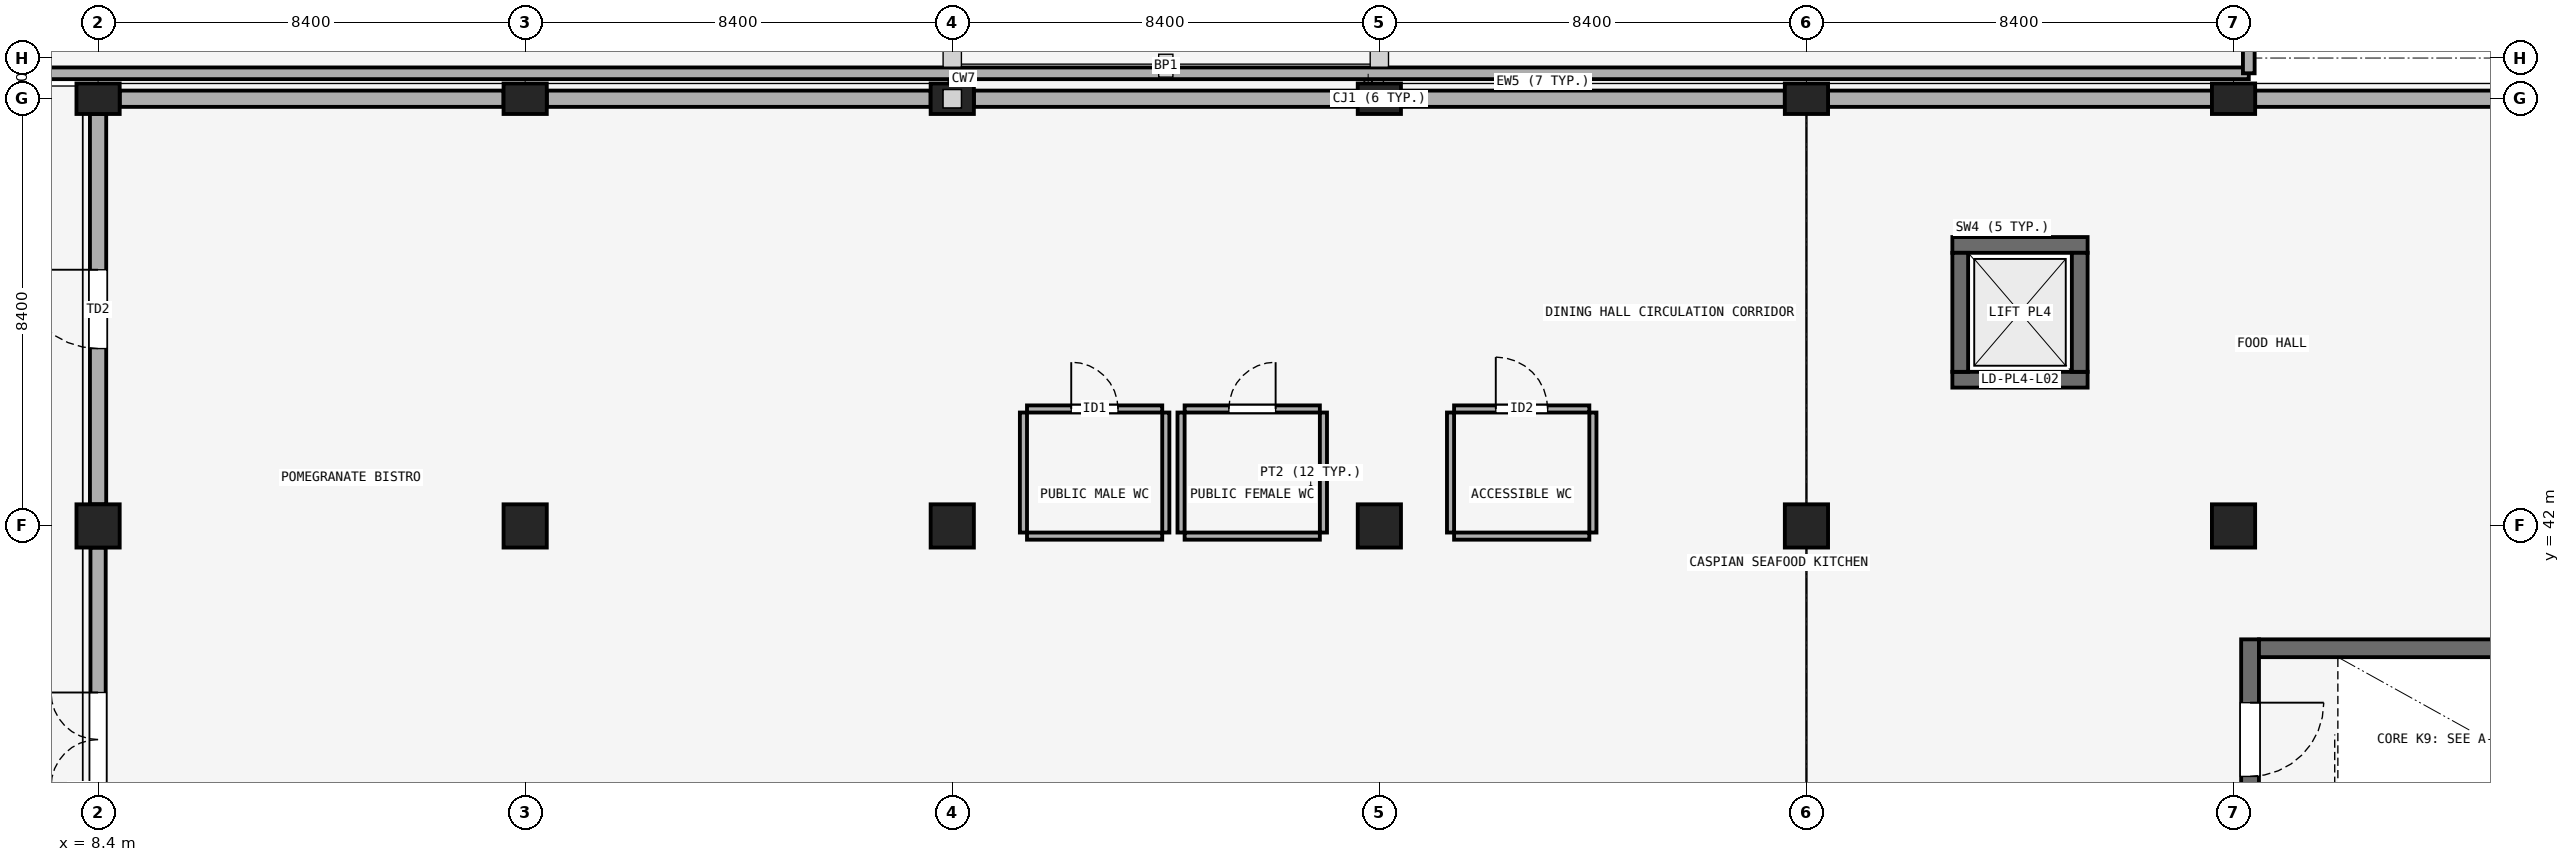
"""IFC4 building model, lengths in metres.
Left out: names, types, materials, properties, quantities, classifications, styles, units other than length and angle.
Written with IfcOpenShell. Run it as: python <this file> out.ifc"""

import sys

from ifc_helpers import new_model, si_unit, direction, frame, frame_2d, origin, origin_2d, place, context, subcontext, project, spatial, rectangle, extrude, element, fill, save


model = new_model("IFC4")
c1 = context("Model", 3, precision=1e-05, world=origin(), true_north=direction((0.0, 1.0)))
c2 = subcontext(c1, "Body", "Model", "MODEL_VIEW")
j1 = project(units=[si_unit("LENGTHUNIT", "METRE"), si_unit("PLANEANGLEUNIT", "RADIAN")], contexts=[c1])
p1 = place(None, origin())
s1 = spatial("IfcSite", under=j1, at=p1, CompositionType="ELEMENT")
p2 = place(p1, origin())
s2 = spatial("IfcBuilding", under=s1, at=p2, CompositionType="ELEMENT")
p3 = place(p2, frame((0.0, 0.0, 9.9)))
s3 = spatial("IfcBuildingStorey", under=s2, at=p3, CompositionType="ELEMENT", Elevation=9.9)
for number, where, z_axis, x_axis in (
    (1, (8.4, 42.0, 0.0), (0.0, 0.0, 1.0), (1.0, 0.0, 0.0)),
    (2, (16.8, 42.0, 0.0), (0.0, 0.0, 1.0), (1.0, 0.0, 0.0)),
    (3, (25.2, 42.0, 0.0), (0.0, 0.0, 1.0), (1.0, 0.0, 0.0)),
    (4, (33.6, 42.0, 0.0), (0.0, 0.0, 1.0), (1.0, 0.0, 0.0)),
    (5, (42.0, 42.0, 0.0), (0.0, 0.0, 1.0), (1.0, 0.0, 0.0)),
    (6, (50.4, 42.0, 0.0), (0.0, 0.0, 1.0), (1.0, 0.0, 0.0)),
):
    element("IfcColumn", number, at=place(p3, frame(where, z_axis=z_axis, x_axis=x_axis)), inside=s3, PredefinedType="COLUMN", context=c2, shape_type="SweptSolid", body=[
        extrude(rectangle(XDim=0.85, YDim=0.85, at=origin_2d()), origin(), (0.0, 0.0, 1.0), 4.5),
    ])
for number, where, z_axis, x_axis in (
    (7, (8.4, 50.4, 0.0), (0.0, 0.0, 1.0), (0.0, 1.0, 0.0)),
    (8, (16.8, 50.4, 0.0), (0.0, 0.0, 1.0), (0.0, 1.0, 0.0)),
    (9, (25.2, 50.4, 0.0), (0.0, 0.0, 1.0), (0.0, 1.0, 0.0)),
    (10, (33.6, 50.4, 0.0), (0.0, 0.0, 1.0), (0.0, 1.0, 0.0)),
    (11, (42.0, 50.4, 0.0), (0.0, 0.0, 1.0), (0.0, 1.0, 0.0)),
    (12, (50.4, 50.4, 0.0), (0.0, 0.0, 1.0), (0.0, 1.0, 0.0)),
):
    element("IfcColumn", number, at=place(p3, frame(where, z_axis=z_axis, x_axis=x_axis)), inside=s3, PredefinedType="COLUMN", context=c2, shape_type="SweptSolid", body=[
        extrude(rectangle(XDim=0.6, YDim=0.85, at=origin_2d()), origin(), (0.0, 0.0, 1.0), 4.5),
    ])
p4 = place(p3, frame((8.825, 50.4, 0.0), z_axis=(0.0, 0.0, 1.0), x_axis=(1.0, 0.0, 0.0)))
e13 = element("IfcWall", 13, at=p4, inside=s3, PredefinedType="SOLIDWALL", context=c2, shape_type="SweptSolid", body=[
    extrude(rectangle(XDim=7.55, YDim=0.32, at=frame_2d((3.775, 0.0))), origin(), (0.0, 0.0, 1.0), 3.49),
])
p5 = place(p3, frame((17.225, 50.4, 0.0), z_axis=(0.0, 0.0, 1.0), x_axis=(1.0, 0.0, 0.0)))
e14 = element("IfcWall", 14, at=p5, inside=s3, PredefinedType="SOLIDWALL", context=c2, shape_type="SweptSolid", body=[
    extrude(rectangle(XDim=7.55, YDim=0.32, at=frame_2d((3.775, 0.0))), origin(), (0.0, 0.0, 1.0), 3.49),
])
for number, where, z_axis, x_axis in (
    (15, (25.625, 50.4, 0.0), (0.0, 0.0, 1.0), (1.0, 0.0, 0.0)),
    (16, (34.025, 50.4, 0.0), (0.0, 0.0, 1.0), (1.0, 0.0, 0.0)),
    (17, (42.425, 50.4, 0.0), (0.0, 0.0, 1.0), (1.0, 0.0, 0.0)),
    (18, (50.825, 50.4, 0.0), (0.0, 0.0, 1.0), (1.0, 0.0, 0.0)),
):
    element("IfcWall", number, at=place(p3, frame(where, z_axis=z_axis, x_axis=x_axis)), inside=s3, PredefinedType="SOLIDWALL", context=c2, shape_type="SweptSolid", body=[
        extrude(rectangle(XDim=7.55, YDim=0.32, at=frame_2d((3.775, 0.0))), origin(), (0.0, 0.0, 1.0), 3.49),
    ])
p6 = place(p3, frame((8.4, 34.025, 0.0), z_axis=(0.0, 0.0, 1.0), x_axis=(0.0, 1.0, 0.0)))
e19 = element("IfcWall", 19, at=p6, inside=s3, PredefinedType="SOLIDWALL", context=c2, shape_type="SweptSolid", body=[
    extrude(rectangle(XDim=7.55, YDim=0.3, at=frame_2d((3.775, 0.0))), origin(), (0.0, 0.0, 1.0), 3.49),
])
p7 = place(p6, frame((2.85, 0.0, 0.0)))
e20 = element("IfcOpeningElement", 20, at=p7, cuts=e19, PredefinedType="OPENING", context=c2, shape_type="SweptSolid", body=[
    extrude(rectangle(XDim=1.85, YDim=2.3, at=frame_2d((0.925, 1.15))), frame((0.0, 0.16, 0.0), z_axis=(0.0, -1.0, 0.0), x_axis=(1.0, 0.0, 0.0)), (0.0, 0.0, 1.0), 0.32),
])
p8 = place(p3, frame((8.4, 42.425, 0.0), z_axis=(0.0, 0.0, 1.0), x_axis=(0.0, 1.0, 0.0)))
e21 = element("IfcWall", 21, at=p8, inside=s3, PredefinedType="SOLIDWALL", context=c2, shape_type="SweptSolid", body=[
    extrude(rectangle(XDim=7.675, YDim=0.32, at=frame_2d((3.837, 0.0))), origin(), (0.0, 0.0, 1.0), 3.49),
])
p9 = place(p8, frame((3.062, 0.0, 0.0)))
e22 = element("IfcOpeningElement", 22, at=p9, cuts=e21, PredefinedType="OPENING", context=c2, shape_type="SweptSolid", body=[
    extrude(rectangle(XDim=1.55, YDim=2.25, at=frame_2d((0.775, 1.125))), frame((0.0, 0.17, 0.0), z_axis=(0.0, -1.0, 0.0), x_axis=(1.0, 0.0, 0.0)), (0.0, 0.0, 1.0), 0.34),
])
p10 = place(p3, frame((-0.3, 50.9, 0.0), z_axis=(0.0, 0.0, 1.0), x_axis=(1.0, 0.0, 0.0)))
e23 = element("IfcWall", 23, at=p10, inside=s3, PredefinedType="PARAPET", context=c2, shape_type="SweptSolid", body=[
    extrude(rectangle(XDim=51.0, YDim=0.23, at=frame_2d((25.5, 0.0))), origin(), (0.0, 0.0, 1.0), 0.95),
])
p11 = place(p3, frame((50.7, 50.9, 0.0), z_axis=(0.0, 0.0, 1.0), x_axis=(0.0, 1.0, 0.0)))
e24 = element("IfcWall", 24, at=p11, inside=s3, PredefinedType="PARAPET", context=c2, shape_type="SweptSolid", body=[
    extrude(rectangle(XDim=8.35, YDim=0.23, at=frame_2d((4.175, 0.0))), origin(), (0.0, 0.0, 1.0), 0.95),
])
p12 = place(p3, frame((50.725, 39.77, 0.0), z_axis=(0.0, 0.0, 1.0), x_axis=(0.0, -1.0, 0.0)))
e25 = element("IfcWall", 25, at=p12, inside=s3, PredefinedType="SHEAR", context=c2, shape_type="SweptSolid", body=[
    extrude(rectangle(XDim=3.94, YDim=0.35, at=frame_2d((1.97, 0.0))), origin(), (0.0, 0.0, 1.0), 4.24),
])
p13 = place(p12, frame((1.245, 0.0, 0.0)))
e26 = element("IfcOpeningElement", 26, at=p13, cuts=e25, PredefinedType="OPENING", context=c2, shape_type="SweptSolid", body=[
    extrude(rectangle(XDim=1.45, YDim=2.2, at=frame_2d((0.725, 1.1))), frame((0.0, 0.185, 0.0), z_axis=(0.0, -1.0, 0.0), x_axis=(1.0, 0.0, 0.0)), (0.0, 0.0, 1.0), 0.37),
])
p14 = place(p3, frame((50.9, 39.595, 0.0), z_axis=(0.0, 0.0, 1.0), x_axis=(1.0, 0.0, 0.0)))
e27 = element("IfcWall", 27, at=p14, inside=s3, PredefinedType="SHEAR", context=c2, shape_type="SweptSolid", body=[
    extrude(rectangle(XDim=7.4, YDim=0.35, at=frame_2d((3.7, 0.0))), origin(), (0.0, 0.0, 1.0), 4.24),
])
p15 = place(p3, frame((44.87, 44.875, 0.0), z_axis=(0.0, 0.0, 1.0), x_axis=(1.0, 0.0, 0.0)))
e28 = element("IfcWall", 28, at=p15, inside=s3, PredefinedType="SHEAR", context=c2, shape_type="SweptSolid", body=[
    extrude(rectangle(XDim=2.66, YDim=0.31, at=frame_2d((1.33, 0.0))), origin(), (0.0, 0.0, 1.0), 4.65),
])
p16 = place(p15, frame((0.78, 0.0, 0.0)))
e29 = element("IfcOpeningElement", 29, at=p16, cuts=e28, PredefinedType="OPENING", context=c2, shape_type="SweptSolid", body=[
    extrude(rectangle(XDim=1.1, YDim=2.2, at=frame_2d((0.55, 1.1))), frame((0.0, 0.165, 0.0), z_axis=(0.0, -1.0, 0.0), x_axis=(1.0, 0.0, 0.0)), (0.0, 0.0, 1.0), 0.33),
])
p17 = place(p3, frame((44.87, 47.525, 0.0), z_axis=(0.0, 0.0, 1.0), x_axis=(1.0, 0.0, 0.0)))
e30 = element("IfcWall", 30, at=p17, inside=s3, PredefinedType="SHEAR", context=c2, shape_type="SweptSolid", body=[
    extrude(rectangle(XDim=2.66, YDim=0.31, at=frame_2d((1.33, 0.0))), origin(), (0.0, 0.0, 1.0), 4.65),
])
for number, where, z_axis, x_axis in (
    (31, (45.025, 45.03, 0.0), (0.0, 0.0, 1.0), (0.0, 1.0, 0.0)),
    (32, (47.375, 45.03, 0.0), (0.0, 0.0, 1.0), (0.0, 1.0, 0.0)),
):
    element("IfcWall", number, at=place(p3, frame(where, z_axis=z_axis, x_axis=x_axis)), inside=s3, PredefinedType="SHEAR", context=c2, shape_type="SweptSolid", body=[
        extrude(rectangle(XDim=2.34, YDim=0.31, at=frame_2d((1.17, 0.0))), origin(), (0.0, 0.0, 1.0), 4.65),
    ])
p18 = place(p3, frame((26.67, 44.3, 0.0), z_axis=(0.0, 0.0, 1.0), x_axis=(1.0, 0.0, 0.0)))
e33 = element("IfcWall", 33, at=p18, inside=s3, PredefinedType="PARTITIONING", context=c2, shape_type="SweptSolid", body=[
    extrude(rectangle(XDim=2.66, YDim=0.14, at=frame_2d((1.33, 0.0))), origin(), (0.0, 0.0, 1.0), 4.2),
])
p19 = place(p18, frame((0.87, 0.0, 0.0)))
e34 = element("IfcOpeningElement", 34, at=p19, cuts=e33, PredefinedType="OPENING", context=c2, shape_type="SweptSolid", body=[
    extrude(rectangle(XDim=0.92, YDim=2.12, at=frame_2d((0.46, 1.06))), frame((0.0, 0.08, 0.0), z_axis=(0.0, -1.0, 0.0), x_axis=(1.0, 0.0, 0.0)), (0.0, 0.0, 1.0), 0.16),
])
p20 = place(p3, frame((26.67, 41.8, 0.0), z_axis=(0.0, 0.0, 1.0), x_axis=(1.0, 0.0, 0.0)))
e35 = element("IfcWall", 35, at=p20, inside=s3, PredefinedType="PARTITIONING", context=c2, shape_type="SweptSolid", body=[
    extrude(rectangle(XDim=2.66, YDim=0.14, at=frame_2d((1.33, 0.0))), origin(), (0.0, 0.0, 1.0), 3.54),
])
for number, where, z_axis, x_axis in (
    (36, (26.6, 41.87, 0.0), (0.0, 0.0, 1.0), (0.0, 1.0, 0.0)),
    (37, (29.4, 41.87, 0.0), (0.0, 0.0, 1.0), (0.0, 1.0, 0.0)),
):
    element("IfcWall", number, at=place(p3, frame(where, z_axis=z_axis, x_axis=x_axis)), inside=s3, PredefinedType="PARTITIONING", context=c2, shape_type="SweptSolid", body=[
        extrude(rectangle(XDim=2.36, YDim=0.14, at=frame_2d((1.18, 0.0))), origin(), (0.0, 0.0, 1.0), 3.54),
    ])
p21 = place(p3, frame((29.77, 44.3, 0.0), z_axis=(0.0, 0.0, 1.0), x_axis=(1.0, 0.0, 0.0)))
e38 = element("IfcWall", 38, at=p21, inside=s3, PredefinedType="PARTITIONING", context=c2, shape_type="SweptSolid", body=[
    extrude(rectangle(XDim=2.66, YDim=0.14, at=frame_2d((1.33, 0.0))), origin(), (0.0, 0.0, 1.0), 4.2),
])
p22 = place(p21, frame((0.87, 0.0, 0.0)))
e39 = element("IfcOpeningElement", 39, at=p22, cuts=e38, PredefinedType="OPENING", context=c2, shape_type="SweptSolid", body=[
    extrude(rectangle(XDim=0.92, YDim=2.12, at=frame_2d((0.46, 1.06))), frame((0.0, 0.08, 0.0), z_axis=(0.0, -1.0, 0.0), x_axis=(1.0, 0.0, 0.0)), (0.0, 0.0, 1.0), 0.16),
])
p23 = place(p3, frame((29.77, 41.8, 0.0), z_axis=(0.0, 0.0, 1.0), x_axis=(1.0, 0.0, 0.0)))
e40 = element("IfcWall", 40, at=p23, inside=s3, PredefinedType="PARTITIONING", context=c2, shape_type="SweptSolid", body=[
    extrude(rectangle(XDim=2.66, YDim=0.14, at=frame_2d((1.33, 0.0))), origin(), (0.0, 0.0, 1.0), 3.54),
])
for number, where, z_axis, x_axis in (
    (41, (29.7, 41.87, 0.0), (0.0, 0.0, 1.0), (0.0, 1.0, 0.0)),
    (42, (32.5, 41.87, 0.0), (0.0, 0.0, 1.0), (0.0, 1.0, 0.0)),
):
    element("IfcWall", number, at=place(p3, frame(where, z_axis=z_axis, x_axis=x_axis)), inside=s3, PredefinedType="PARTITIONING", context=c2, shape_type="SweptSolid", body=[
        extrude(rectangle(XDim=2.36, YDim=0.14, at=frame_2d((1.18, 0.0))), origin(), (0.0, 0.0, 1.0), 3.54),
    ])
p24 = place(p3, frame((35.07, 44.3, 0.0), z_axis=(0.0, 0.0, 1.0), x_axis=(1.0, 0.0, 0.0)))
e43 = element("IfcWall", 43, at=p24, inside=s3, PredefinedType="PARTITIONING", context=c2, shape_type="SweptSolid", body=[
    extrude(rectangle(XDim=2.66, YDim=0.14, at=frame_2d((1.33, 0.0))), origin(), (0.0, 0.0, 1.0), 4.2),
])
p25 = place(p24, frame((0.82, 0.0, 0.0)))
e44 = element("IfcOpeningElement", 44, at=p25, cuts=e43, PredefinedType="OPENING", context=c2, shape_type="SweptSolid", body=[
    extrude(rectangle(XDim=1.02, YDim=2.15, at=frame_2d((0.51, 1.075))), frame((0.0, 0.08, 0.0), z_axis=(0.0, -1.0, 0.0), x_axis=(1.0, 0.0, 0.0)), (0.0, 0.0, 1.0), 0.16),
])
p26 = place(p3, frame((35.07, 41.8, 0.0), z_axis=(0.0, 0.0, 1.0), x_axis=(1.0, 0.0, 0.0)))
e45 = element("IfcWall", 45, at=p26, inside=s3, PredefinedType="PARTITIONING", context=c2, shape_type="SweptSolid", body=[
    extrude(rectangle(XDim=2.66, YDim=0.14, at=frame_2d((1.33, 0.0))), origin(), (0.0, 0.0, 1.0), 3.54),
])
for number, where, z_axis, x_axis in (
    (46, (35.0, 41.87, 0.0), (0.0, 0.0, 1.0), (0.0, 1.0, 0.0)),
    (47, (37.8, 41.87, 0.0), (0.0, 0.0, 1.0), (0.0, 1.0, 0.0)),
):
    element("IfcWall", number, at=place(p3, frame(where, z_axis=z_axis, x_axis=x_axis)), inside=s3, PredefinedType="PARTITIONING", context=c2, shape_type="SweptSolid", body=[
        extrude(rectangle(XDim=2.36, YDim=0.14, at=frame_2d((1.18, 0.0))), origin(), (0.0, 0.0, 1.0), 3.54),
    ])
p27 = place(p7, origin())
e48 = element("IfcDoor", 48, at=p27, inside=s3, OperationType="DOUBLE_DOOR_SINGLE_SWING", PredefinedType="DOOR", context=c2, shape_type="SweptSolid", body=[
    extrude(rectangle(XDim=1.85, YDim=2.3, at=frame_2d((0.925, 1.15))), frame((0.0, 0.025, 0.0), z_axis=(0.0, -1.0, 0.0), x_axis=(1.0, 0.0, 0.0)), (0.0, 0.0, 1.0), 0.05),
])
fill(e20, e48)
p28 = place(p9, origin())
e49 = element("IfcDoor", 49, at=p28, inside=s3, OperationType="SINGLE_SWING_RIGHT", PredefinedType="DOOR", context=c2, shape_type="SweptSolid", body=[
    extrude(rectangle(XDim=1.55, YDim=2.25, at=frame_2d((0.775, 1.125))), frame((0.0, 0.025, 0.0), z_axis=(0.0, -1.0, 0.0), x_axis=(1.0, 0.0, 0.0)), (0.0, 0.0, 1.0), 0.05),
])
fill(e22, e49)
p29 = place(p13, origin())
e50 = element("IfcDoor", 50, at=p29, inside=s3, OperationType="SINGLE_SWING_LEFT", PredefinedType="DOOR", context=c2, shape_type="SweptSolid", body=[
    extrude(rectangle(XDim=1.45, YDim=2.2, at=frame_2d((0.725, 1.1))), frame((0.0, 0.025, 0.0), z_axis=(0.0, -1.0, 0.0), x_axis=(1.0, 0.0, 0.0)), (0.0, 0.0, 1.0), 0.05),
])
fill(e26, e50)
p30 = place(p16, origin())
e51 = element("IfcDoor", 51, at=p30, inside=s3, OperationType="SLIDING_TO_LEFT", PredefinedType="DOOR", context=c2, shape_type="SweptSolid", body=[
    extrude(rectangle(XDim=1.1, YDim=2.2, at=frame_2d((0.55, 1.1))), frame((0.0, 0.025, 0.0), z_axis=(0.0, -1.0, 0.0), x_axis=(1.0, 0.0, 0.0)), (0.0, 0.0, 1.0), 0.05),
])
fill(e29, e51)
p31 = place(p19, origin())
e52 = element("IfcDoor", 52, at=p31, inside=s3, OperationType="SINGLE_SWING_LEFT", PredefinedType="DOOR", context=c2, shape_type="SweptSolid", body=[
    extrude(rectangle(XDim=0.92, YDim=2.12, at=frame_2d((0.46, 1.06))), frame((0.0, 0.025, 0.0), z_axis=(0.0, -1.0, 0.0), x_axis=(1.0, 0.0, 0.0)), (0.0, 0.0, 1.0), 0.05),
])
fill(e34, e52)
p32 = place(p22, origin())
e53 = element("IfcDoor", 53, at=p32, inside=s3, OperationType="SINGLE_SWING_RIGHT", PredefinedType="DOOR", context=c2, shape_type="SweptSolid", body=[
    extrude(rectangle(XDim=0.92, YDim=2.12, at=frame_2d((0.46, 1.06))), frame((0.0, 0.025, 0.0), z_axis=(0.0, -1.0, 0.0), x_axis=(1.0, 0.0, 0.0)), (0.0, 0.0, 1.0), 0.05),
])
fill(e39, e53)
p33 = place(p25, origin())
e54 = element("IfcDoor", 54, at=p33, inside=s3, OperationType="SINGLE_SWING_LEFT", PredefinedType="DOOR", context=c2, shape_type="SweptSolid", body=[
    extrude(rectangle(XDim=1.02, YDim=2.15, at=frame_2d((0.51, 1.075))), frame((0.0, 0.025, 0.0), z_axis=(0.0, -1.0, 0.0), x_axis=(1.0, 0.0, 0.0)), (0.0, 0.0, 1.0), 0.05),
])
fill(e44, e54)
save(model, sys.argv[1])
